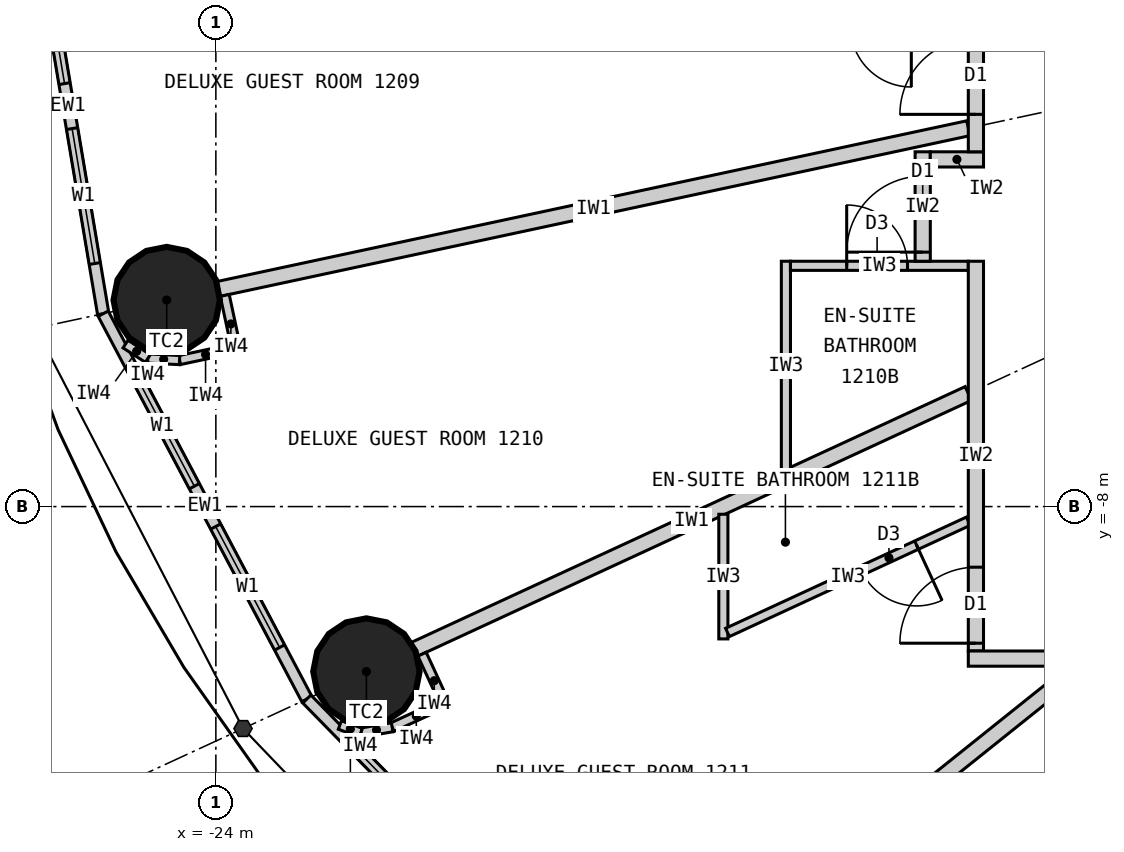
"""IFC4 building model, lengths in metres.
Left out: names, types, materials, properties, quantities, classifications, styles, units other than length and angle.
Written with IfcOpenShell. Run it as: python <this file> out.ifc"""

import sys

from ifc_helpers import new_model, si_unit, direction, frame, frame_2d, origin, origin_2d, place, context, subcontext, project, spatial, rectangle, circle, extrude, element, fill, save


model = new_model("IFC4")
c1 = context("Model", 3, precision=1e-05, world=origin(), true_north=direction((0.0, 1.0)))
c2 = subcontext(c1, "Body", "Model", "MODEL_VIEW")
j1 = project(units=[si_unit("LENGTHUNIT", "METRE"), si_unit("PLANEANGLEUNIT", "RADIAN")], contexts=[c1])
p1 = place(None, origin())
s1 = spatial("IfcSite", under=j1, at=p1, CompositionType="ELEMENT")
p2 = place(p1, origin())
s2 = spatial("IfcBuilding", under=s1, at=p2, CompositionType="ELEMENT")
p3 = place(p2, frame((0.0, 0.0, 54.0)))
s3 = spatial("IfcBuildingStorey", under=s2, at=p3, CompositionType="ELEMENT", Elevation=54.0)
for number, where, z_axis, x_axis in (
    (1, (-24.647, -5.283, 0.0), (0.0, 0.0, 1.0), (1.0, 0.0, 0.0)),
    (2, (-22.019, -10.17, 0.0), (0.0, 0.0, 1.0), (1.0, 0.0, 0.0)),
):
    element("IfcColumn", number, at=place(p3, frame(where, z_axis=z_axis, x_axis=x_axis)), inside=s3, PredefinedType="COLUMN", context=c2, shape_type="SweptSolid", body=[
        extrude(circle(Radius=0.7, at=origin_2d()), origin(), (0.0, 0.0, 1.0), 3.3),
    ])
p4 = place(p3, frame((-26.4, 0.0, 0.0), z_axis=(0.0, 0.0, 1.0), x_axis=(0.165642551694, -0.986185857264, 0.0)))
e3 = element("IfcWall", 3, at=p4, inside=s3, PredefinedType="ELEMENTEDWALL", context=c2, shape_type="SweptSolid", body=[
    extrude(rectangle(XDim=5.539, YDim=0.15, at=frame_2d((2.77, 0.0))), origin(), (0.0, 0.0, 1.0), 3.12),
])
p5 = place(p4, frame((0.669, 0.0, 0.9)))
e4 = element("IfcOpeningElement", 4, at=p5, cuts=e3, PredefinedType="OPENING", context=c2, shape_type="SweptSolid", body=[
    extrude(rectangle(XDim=1.8, YDim=1.9, at=frame_2d((0.9, 0.95))), frame((0.0, 0.085, 0.0), z_axis=(0.0, -1.0, 0.0), x_axis=(1.0, 0.0, 0.0)), (0.0, 0.0, 1.0), 0.17),
])
p6 = place(p4, frame((3.07, 0.0, 0.9)))
e5 = element("IfcOpeningElement", 5, at=p6, cuts=e3, PredefinedType="OPENING", context=c2, shape_type="SweptSolid", body=[
    extrude(rectangle(XDim=1.8, YDim=1.9, at=frame_2d((0.9, 0.95))), frame((0.0, 0.085, 0.0), z_axis=(0.0, -1.0, 0.0), x_axis=(1.0, 0.0, 0.0)), (0.0, 0.0, 1.0), 0.17),
])
p7 = place(p3, frame((-25.482, -5.462, 0.0), z_axis=(0.0, 0.0, 1.0), x_axis=(0.467296867008, -0.884100468321, 0.0)))
e6 = element("IfcWall", 6, at=p7, inside=s3, PredefinedType="ELEMENTEDWALL", context=c2, shape_type="SweptSolid", body=[
    extrude(rectangle(XDim=5.734, YDim=0.15, at=frame_2d((2.867, 0.0))), origin(), (0.0, 0.0, 1.0), 3.12),
])
p8 = place(p7, frame((0.767, 0.0, 0.9)))
e7 = element("IfcOpeningElement", 7, at=p8, cuts=e6, PredefinedType="OPENING", context=c2, shape_type="SweptSolid", body=[
    extrude(rectangle(XDim=1.8, YDim=1.9, at=frame_2d((0.9, 0.95))), frame((0.0, 0.085, 0.0), z_axis=(0.0, -1.0, 0.0), x_axis=(1.0, 0.0, 0.0)), (0.0, 0.0, 1.0), 0.17),
])
p9 = place(p7, frame((3.167, 0.0, 0.9)))
e8 = element("IfcOpeningElement", 8, at=p9, cuts=e6, PredefinedType="OPENING", context=c2, shape_type="SweptSolid", body=[
    extrude(rectangle(XDim=1.8, YDim=1.9, at=frame_2d((0.9, 0.95))), frame((0.0, 0.085, 0.0), z_axis=(0.0, -1.0, 0.0), x_axis=(1.0, 0.0, 0.0)), (0.0, 0.0, 1.0), 0.17),
])
p10 = place(p3, frame((-22.803, -10.532, 0.0), z_axis=(0.0, 0.0, 1.0), x_axis=(0.699602905915, -0.714531856557, 0.0)))
e9 = element("IfcWall", 9, at=p10, inside=s3, PredefinedType="ELEMENTEDWALL", context=c2, shape_type="SweptSolid", body=[
    extrude(rectangle(XDim=6.051, YDim=0.15, at=frame_2d((3.025, 0.0))), origin(), (0.0, 0.0, 1.0), 3.12),
])
p11 = place(p10, frame((0.926, 0.0, 0.9)))
e10 = element("IfcOpeningElement", 10, at=p11, cuts=e9, PredefinedType="OPENING", context=c2, shape_type="SweptSolid", body=[
    extrude(rectangle(XDim=1.8, YDim=1.9, at=frame_2d((0.9, 0.95))), frame((0.0, 0.085, 0.0), z_axis=(0.0, -1.0, 0.0), x_axis=(1.0, 0.0, 0.0)), (0.0, 0.0, 1.0), 0.17),
])
p12 = place(p10, frame((3.325, 0.0, 0.9)))
e11 = element("IfcOpeningElement", 11, at=p12, cuts=e9, PredefinedType="OPENING", context=c2, shape_type="SweptSolid", body=[
    extrude(rectangle(XDim=1.8, YDim=1.9, at=frame_2d((0.9, 0.95))), frame((0.0, 0.085, 0.0), z_axis=(0.0, -1.0, 0.0), x_axis=(1.0, 0.0, 0.0)), (0.0, 0.0, 1.0), 0.17),
])
p13 = place(p3, frame((-14.1, -3.022, 0.0), z_axis=(0.0, 0.0, 1.0), x_axis=(-0.977790014929, -0.209586943072, 0.0)))
e12 = element("IfcWall", 12, at=p13, inside=s3, PredefinedType="PARTITIONING", context=c2, shape_type="SweptSolid", body=[
    extrude(rectangle(XDim=10.087, YDim=0.2, at=frame_2d((5.043, 0.0))), origin(), (0.0, 0.0, 1.0), 2.32),
])
p14 = place(p3, frame((-14.1, -6.512, 0.0), z_axis=(0.0, 0.0, 1.0), x_axis=(-0.907832871056, -0.419332181247, 0.0)))
e13 = element("IfcWall", 13, at=p14, inside=s3, PredefinedType="PARTITIONING", context=c2, shape_type="SweptSolid", body=[
    extrude(rectangle(XDim=8.023, YDim=0.2, at=frame_2d((4.011, 0.0))), origin(), (0.0, 0.0, 1.0), 2.32),
])
p15 = place(p3, frame((-12.625, -10.1, 0.0), z_axis=(0.0, 0.0, 1.0), x_axis=(-0.780892451574, -0.624665493744, 0.0)))
e14 = element("IfcWall", 14, at=p15, inside=s3, PredefinedType="PARTITIONING", context=c2, shape_type="SweptSolid", body=[
    extrude(rectangle(XDim=6.045, YDim=0.2, at=frame_2d((3.022, 0.0))), origin(), (0.0, 0.0, 1.0), 2.32),
])
p16 = place(p3, frame((-16.5, -7.521, 0.0), z_axis=(0.0, 0.0, 1.0), x_axis=(0.0, 1.0, 0.0)))
e15 = element("IfcWall", 15, at=p16, inside=s3, PredefinedType="PARTITIONING", context=c2, shape_type="SweptSolid", body=[
    extrude(rectangle(XDim=2.749, YDim=0.12, at=frame_2d((1.374, 0.0))), origin(), (0.0, 0.0, 1.0), 3.12),
])
p17 = place(p3, frame((-14.1, -4.833, 0.0), z_axis=(0.0, 0.0, 1.0), x_axis=(-1.0, 0.0, 0.0)))
e16 = element("IfcWall", 16, at=p17, inside=s3, PredefinedType="PARTITIONING", context=c2, shape_type="SweptSolid", body=[
    extrude(rectangle(XDim=2.34, YDim=0.12, at=frame_2d((1.17, 0.0))), origin(), (0.0, 0.0, 1.0), 3.12),
])
p18 = place(p17, frame((0.8, 0.0, 0.0)))
e17 = element("IfcOpeningElement", 17, at=p18, cuts=e16, PredefinedType="OPENING", context=c2, shape_type="SweptSolid", body=[
    extrude(rectangle(XDim=0.8, YDim=2.1, at=frame_2d((0.4, 1.05))), frame((0.0, 0.07, 0.0), z_axis=(0.0, -1.0, 0.0), x_axis=(1.0, 0.0, 0.0)), (0.0, 0.0, 1.0), 0.14),
])
p19 = place(p3, frame((-17.323, -8.101, 0.0), z_axis=(0.0, 0.0, 1.0), x_axis=(0.0, -1.0, 0.0)))
e18 = element("IfcWall", 18, at=p19, inside=s3, PredefinedType="PARTITIONING", context=c2, shape_type="SweptSolid", body=[
    extrude(rectangle(XDim=1.64, YDim=0.12, at=frame_2d((0.82, 0.0))), origin(), (0.0, 0.0, 1.0), 3.12),
])
p20 = place(p3, frame((-14.1, -8.193, 0.0), z_axis=(0.0, 0.0, 1.0), x_axis=(-0.907836493557, -0.419324338628, 0.0)))
e19 = element("IfcWall", 19, at=p20, inside=s3, PredefinedType="PARTITIONING", context=c2, shape_type="SweptSolid", body=[
    extrude(rectangle(XDim=3.49, YDim=0.12, at=frame_2d((1.745, 0.0))), origin(), (0.0, 0.0, 1.0), 3.12),
])
p21 = place(p20, frame((0.75, 0.0, 0.0)))
e20 = element("IfcOpeningElement", 20, at=p21, cuts=e19, PredefinedType="OPENING", context=c2, shape_type="SweptSolid", body=[
    extrude(rectangle(XDim=0.8, YDim=2.1, at=frame_2d((0.4, 1.05))), frame((0.0, 0.07, 0.0), z_axis=(0.0, -1.0, 0.0), x_axis=(1.0, 0.0, 0.0)), (0.0, 0.0, 1.0), 0.14),
])
p22 = place(p3, frame((-14.7, -3.333, 0.0), z_axis=(0.0, 0.0, 1.0), x_axis=(0.0, -1.0, 0.0)))
e21 = element("IfcWall", 21, at=p22, inside=s3, PredefinedType="PARTITIONING", context=c2, shape_type="SweptSolid", body=[
    extrude(rectangle(XDim=1.44, YDim=0.2, at=frame_2d((0.72, 0.0))), origin(), (0.0, 0.0, 1.0), 3.12),
])
p23 = place(p22, frame((0.32, 0.0, 0.0)))
e22 = element("IfcOpeningElement", 22, at=p23, cuts=e21, PredefinedType="OPENING", context=c2, shape_type="SweptSolid", body=[
    extrude(rectangle(XDim=1.0, YDim=2.2, at=frame_2d((0.5, 1.1))), frame((0.0, 0.11, 0.0), z_axis=(0.0, -1.0, 0.0), x_axis=(1.0, 0.0, 0.0)), (0.0, 0.0, 1.0), 0.22),
])
p24 = place(p3, frame((-13.9, -3.433, 0.0), z_axis=(0.0, 0.0, 1.0), x_axis=(-1.0, 0.0, 0.0)))
e23 = element("IfcWall", 23, at=p24, inside=s3, PredefinedType="PARTITIONING", context=c2, shape_type="SweptSolid", body=[
    extrude(rectangle(XDim=0.7, YDim=0.2, at=frame_2d((0.35, 0.0))), origin(), (0.0, 0.0, 1.0), 2.32),
])
p25 = place(p3, frame((-14.0, 3.333, 0.0), z_axis=(0.0, 0.0, 1.0), x_axis=(0.0, -1.0, 0.0)))
e24 = element("IfcWall", 24, at=p25, inside=s3, PredefinedType="PARTITIONING", context=c2, shape_type="SweptSolid", body=[
    extrude(rectangle(XDim=6.665, YDim=0.2, at=frame_2d((3.333, 0.0))), origin(), (0.0, 0.0, 1.0), 3.12),
])
p26 = place(p25, frame((2.15, 0.0, 0.0)))
e25 = element("IfcOpeningElement", 25, at=p26, cuts=e24, PredefinedType="OPENING", context=c2, shape_type="SweptSolid", body=[
    extrude(rectangle(XDim=1.0, YDim=2.2, at=frame_2d((0.5, 1.1))), frame((0.0, 0.11, 0.0), z_axis=(0.0, -1.0, 0.0), x_axis=(1.0, 0.0, 0.0)), (0.0, 0.0, 1.0), 0.22),
])
p27 = place(p25, frame((5.173, 0.0, 0.0)))
e26 = element("IfcOpeningElement", 26, at=p27, cuts=e24, PredefinedType="OPENING", context=c2, shape_type="SweptSolid", body=[
    extrude(rectangle(XDim=1.0, YDim=2.2, at=frame_2d((0.5, 1.1))), frame((0.0, 0.11, 0.0), z_axis=(0.0, -1.0, 0.0), x_axis=(1.0, 0.0, 0.0)), (0.0, 0.0, 1.0), 0.22),
])
p28 = place(p3, frame((-14.0, -4.772, 0.0), z_axis=(0.0, 0.0, 1.0), x_axis=(0.0, -1.0, 0.0)))
e27 = element("IfcWall", 27, at=p28, inside=s3, PredefinedType="PARTITIONING", context=c2, shape_type="SweptSolid", body=[
    extrude(rectangle(XDim=5.127, YDim=0.2, at=frame_2d((2.564, 0.0))), origin(), (0.0, 0.0, 1.0), 3.12),
])
p29 = place(p28, frame((4.025, 0.0, 0.0)))
e28 = element("IfcOpeningElement", 28, at=p29, cuts=e27, PredefinedType="OPENING", context=c2, shape_type="SweptSolid", body=[
    extrude(rectangle(XDim=1.0, YDim=2.2, at=frame_2d((0.5, 1.1))), frame((0.0, 0.11, 0.0), z_axis=(0.0, -1.0, 0.0), x_axis=(1.0, 0.0, 0.0)), (0.0, 0.0, 1.0), 0.22),
])
p30 = place(p3, frame((-10.885, -10.0, 0.0), z_axis=(0.0, 0.0, 1.0), x_axis=(-1.0, 0.0, 0.0)))
e29 = element("IfcWall", 29, at=p30, inside=s3, PredefinedType="PARTITIONING", context=c2, shape_type="SweptSolid", body=[
    extrude(rectangle(XDim=3.215, YDim=0.2, at=frame_2d((1.607, 0.0))), origin(), (0.0, 0.0, 1.0), 3.12),
])
p31 = place(p3, frame((-23.883, -5.222, 0.0), z_axis=(0.0, 0.0, 1.0), x_axis=(0.209311842415, -0.977848941619, 0.0)))
e30 = element("IfcWall", 30, at=p31, inside=s3, PredefinedType="PARTITIONING", context=c2, shape_type="SweptSolid", body=[
    extrude(rectangle(XDim=0.768, YDim=0.12, at=frame_2d((0.384, 0.0))), origin(), (0.0, 0.0, 1.0), 3.12),
])
p32 = place(p3, frame((-23.793, -5.926, 0.0), z_axis=(0.0, 0.0, 1.0), x_axis=(-0.977792206673, -0.209576717621, 0.0)))
e31 = element("IfcWall", 31, at=p32, inside=s3, PredefinedType="PARTITIONING", context=c2, shape_type="SweptSolid", body=[
    extrude(rectangle(XDim=0.7, YDim=0.12, at=frame_2d((0.35, 0.0))), origin(), (0.0, 0.0, 1.0), 3.12),
])
p33 = place(p3, frame((-24.478, -6.073, 0.0), z_axis=(0.0, 0.0, 1.0), x_axis=(-0.998708262812, 0.05081147302, 0.0)))
e32 = element("IfcWall", 32, at=p33, inside=s3, PredefinedType="PARTITIONING", context=c2, shape_type="SweptSolid", body=[
    extrude(rectangle(XDim=0.418, YDim=0.12, at=frame_2d((0.209, 0.0))), origin(), (0.0, 0.0, 1.0), 3.12),
])
p34 = place(p3, frame((-24.895, -6.052, 0.0), z_axis=(0.0, 0.0, 1.0), x_axis=(-0.839495197275, 0.54336710772, 0.0)))
e33 = element("IfcWall", 33, at=p34, inside=s3, PredefinedType="PARTITIONING", context=c2, shape_type="SweptSolid", body=[
    extrude(rectangle(XDim=0.35, YDim=0.12, at=frame_2d((0.175, 0.0))), origin(), (0.0, 0.0, 1.0), 3.12),
])
p35 = place(p3, frame((-21.287, -9.942, 0.0), z_axis=(0.0, 0.0, 1.0), x_axis=(0.419259891039, -0.907866258744, 0.0)))
e34 = element("IfcWall", 34, at=p35, inside=s3, PredefinedType="PARTITIONING", context=c2, shape_type="SweptSolid", body=[
    extrude(rectangle(XDim=0.768, YDim=0.12, at=frame_2d((0.384, 0.0))), origin(), (0.0, 0.0, 1.0), 3.12),
])
p36 = place(p3, frame((-21.045, -10.61, 0.0), z_axis=(0.0, 0.0, 1.0), x_axis=(-0.907877701396, -0.419235112208, 0.0)))
e35 = element("IfcWall", 35, at=p36, inside=s3, PredefinedType="PARTITIONING", context=c2, shape_type="SweptSolid", body=[
    extrude(rectangle(XDim=0.7, YDim=0.12, at=frame_2d((0.35, 0.0))), origin(), (0.0, 0.0, 1.0), 3.12),
])
p37 = place(p3, frame((-21.68, -10.903, 0.0), z_axis=(0.0, 0.0, 1.0), x_axis=(-0.985446622073, -0.169985161247, 0.0)))
e36 = element("IfcWall", 36, at=p37, inside=s3, PredefinedType="PARTITIONING", context=c2, shape_type="SweptSolid", body=[
    extrude(rectangle(XDim=0.418, YDim=0.12, at=frame_2d((0.209, 0.0))), origin(), (0.0, 0.0, 1.0), 3.12),
])
p38 = place(p3, frame((-22.092, -10.974, 0.0), z_axis=(0.0, 0.0, 1.0), x_axis=(-0.938428160676, 0.345474437912, 0.0)))
e37 = element("IfcWall", 37, at=p38, inside=s3, PredefinedType="PARTITIONING", context=c2, shape_type="SweptSolid", body=[
    extrude(rectangle(XDim=0.294, YDim=0.12, at=frame_2d((0.147, 0.0))), origin(), (0.0, 0.0, 1.0), 3.12),
])
p39 = place(p5, origin())
e38 = element("IfcWindow", 38, at=p39, inside=s3, PartitioningType="SINGLE_PANEL", PredefinedType="WINDOW", context=c2, shape_type="SweptSolid", body=[
    extrude(rectangle(XDim=1.8, YDim=1.9, at=frame_2d((0.9, 0.95))), frame((0.0, 0.03, 0.0), z_axis=(0.0, -1.0, 0.0), x_axis=(1.0, 0.0, 0.0)), (0.0, 0.0, 1.0), 0.06),
])
fill(e4, e38)
p40 = place(p6, origin())
e39 = element("IfcWindow", 39, at=p40, inside=s3, PartitioningType="SINGLE_PANEL", PredefinedType="WINDOW", context=c2, shape_type="SweptSolid", body=[
    extrude(rectangle(XDim=1.8, YDim=1.9, at=frame_2d((0.9, 0.95))), frame((0.0, 0.03, 0.0), z_axis=(0.0, -1.0, 0.0), x_axis=(1.0, 0.0, 0.0)), (0.0, 0.0, 1.0), 0.06),
])
fill(e5, e39)
p41 = place(p8, origin())
e40 = element("IfcWindow", 40, at=p41, inside=s3, PartitioningType="SINGLE_PANEL", PredefinedType="WINDOW", context=c2, shape_type="SweptSolid", body=[
    extrude(rectangle(XDim=1.8, YDim=1.9, at=frame_2d((0.9, 0.95))), frame((0.0, 0.03, 0.0), z_axis=(0.0, -1.0, 0.0), x_axis=(1.0, 0.0, 0.0)), (0.0, 0.0, 1.0), 0.06),
])
fill(e7, e40)
p42 = place(p9, origin())
e41 = element("IfcWindow", 41, at=p42, inside=s3, PartitioningType="SINGLE_PANEL", PredefinedType="WINDOW", context=c2, shape_type="SweptSolid", body=[
    extrude(rectangle(XDim=1.8, YDim=1.9, at=frame_2d((0.9, 0.95))), frame((0.0, 0.03, 0.0), z_axis=(0.0, -1.0, 0.0), x_axis=(1.0, 0.0, 0.0)), (0.0, 0.0, 1.0), 0.06),
])
fill(e8, e41)
p43 = place(p11, origin())
e42 = element("IfcWindow", 42, at=p43, inside=s3, PartitioningType="SINGLE_PANEL", PredefinedType="WINDOW", context=c2, shape_type="SweptSolid", body=[
    extrude(rectangle(XDim=1.8, YDim=1.9, at=frame_2d((0.9, 0.95))), frame((0.0, 0.03, 0.0), z_axis=(0.0, -1.0, 0.0), x_axis=(1.0, 0.0, 0.0)), (0.0, 0.0, 1.0), 0.06),
])
fill(e10, e42)
p44 = place(p27, origin())
e43 = element("IfcDoor", 43, at=p44, inside=s3, OperationType="SINGLE_SWING_RIGHT", PredefinedType="DOOR", context=c2, shape_type="SweptSolid", body=[
    extrude(rectangle(XDim=1.0, YDim=2.2, at=frame_2d((0.5, 1.1))), frame((0.0, 0.025, 0.0), z_axis=(0.0, -1.0, 0.0), x_axis=(1.0, 0.0, 0.0)), (0.0, 0.0, 1.0), 0.05),
])
fill(e26, e43)
p45 = place(p18, origin())
e44 = element("IfcDoor", 44, at=p45, inside=s3, OperationType="SINGLE_SWING_RIGHT", PredefinedType="DOOR", context=c2, shape_type="SweptSolid", body=[
    extrude(rectangle(XDim=0.8, YDim=2.1, at=frame_2d((0.4, 1.05))), frame((0.0, 0.025, 0.0), z_axis=(0.0, -1.0, 0.0), x_axis=(1.0, 0.0, 0.0)), (0.0, 0.0, 1.0), 0.05),
])
fill(e17, e44)
p46 = place(p23, origin())
e45 = element("IfcDoor", 45, at=p46, inside=s3, OperationType="SINGLE_SWING_RIGHT", PredefinedType="DOOR", context=c2, shape_type="SweptSolid", body=[
    extrude(rectangle(XDim=1.0, YDim=2.2, at=frame_2d((0.5, 1.1))), frame((0.0, 0.025, 0.0), z_axis=(0.0, -1.0, 0.0), x_axis=(1.0, 0.0, 0.0)), (0.0, 0.0, 1.0), 0.05),
])
fill(e22, e45)
p47 = place(p21, origin())
e46 = element("IfcDoor", 46, at=p47, inside=s3, OperationType="SINGLE_SWING_LEFT", PredefinedType="DOOR", context=c2, shape_type="SweptSolid", body=[
    extrude(rectangle(XDim=0.8, YDim=2.1, at=frame_2d((0.4, 1.05))), frame((0.0, 0.025, 0.0), z_axis=(0.0, -1.0, 0.0), x_axis=(1.0, 0.0, 0.0)), (0.0, 0.0, 1.0), 0.05),
])
fill(e20, e46)
p48 = place(p29, origin())
e47 = element("IfcDoor", 47, at=p48, inside=s3, OperationType="SINGLE_SWING_RIGHT", PredefinedType="DOOR", context=c2, shape_type="SweptSolid", body=[
    extrude(rectangle(XDim=1.0, YDim=2.2, at=frame_2d((0.5, 1.1))), frame((0.0, 0.025, 0.0), z_axis=(0.0, -1.0, 0.0), x_axis=(1.0, 0.0, 0.0)), (0.0, 0.0, 1.0), 0.05),
])
fill(e28, e47)
save(model, sys.argv[1])
